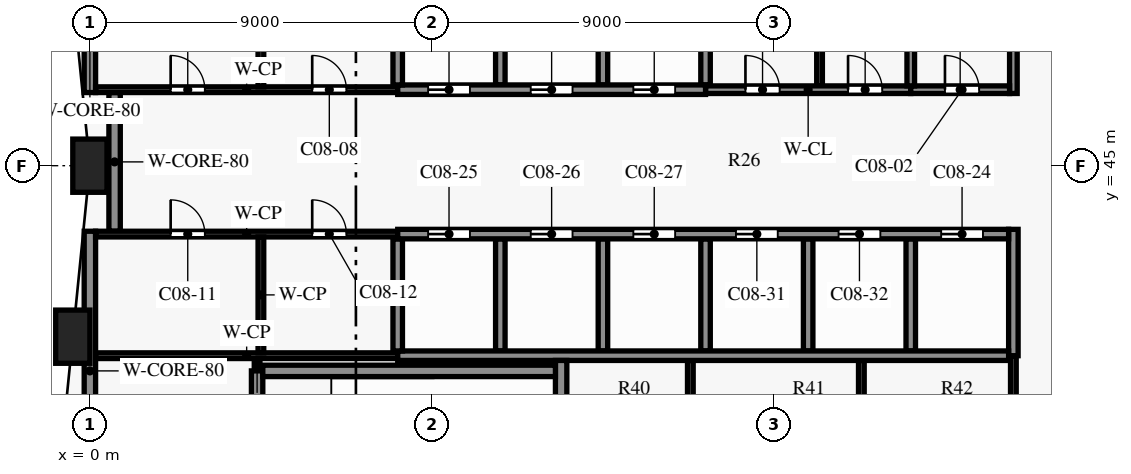
"""IFC4 building model, lengths in metres.
Left out: names, types, materials, properties, quantities, classifications, styles, units other than length and angle.
Written with IfcOpenShell. Run it as: python <this file> out.ifc"""

import sys

from ifc_helpers import new_model, si_unit, direction, frame, frame_2d, origin, origin_2d, place, context, subcontext, project, spatial, rectangle, extrude, element, fill, save


model = new_model("IFC4")
c1 = context("Model", 3, precision=1e-05, world=origin(), true_north=direction((0.0, 1.0)))
c2 = subcontext(c1, "Body", "Model", "MODEL_VIEW")
j1 = project(units=[si_unit("LENGTHUNIT", "METRE"), si_unit("PLANEANGLEUNIT", "RADIAN")], contexts=[c1])
p1 = place(None, origin())
s1 = spatial("IfcSite", under=j1, at=p1, CompositionType="ELEMENT")
p2 = place(p1, origin())
s2 = spatial("IfcBuilding", under=s1, at=p2, CompositionType="ELEMENT")
p3 = place(p2, frame((0.0, 0.0, 37.5)))
s3 = spatial("IfcBuildingStorey", under=s2, at=p3, CompositionType="ELEMENT", Elevation=37.5)
for number, where, z_axis, x_axis in (
    (1, (0.0, 45.0, 0.0), (0.0, 0.0, 1.0), (0.0, -1.0, 0.0)),
    (2, (-0.45, 40.5, 0.0), (0.0, 0.0, 1.0), (-0.1, -0.995, 0.0)),
):
    element("IfcColumn", number, at=place(p3, frame(where, z_axis=z_axis, x_axis=x_axis)), inside=s3, PredefinedType="COLUMN", context=c2, shape_type="SweptSolid", body=[
        extrude(rectangle(XDim=0.9, YDim=1.4, at=origin_2d()), origin(), (0.0, 0.0, 1.0), 3.6),
    ])
p4 = place(p3, frame((4.55, 39.6, 0.0), z_axis=(0.0, 0.0, 1.0), x_axis=(1.0, 0.0, 0.0)))
e3 = element("IfcWall", 3, at=p4, inside=s3, PredefinedType="SHEAR", context=c2, shape_type="SweptSolid", body=[
    extrude(rectangle(XDim=7.7, YDim=0.3, at=frame_2d((3.85, 0.0))), origin(), (0.0, 0.0, 1.0), 3.3),
])
p5 = place(p3, frame((0.15, 40.0, 0.0), z_axis=(0.0, 0.0, 1.0), x_axis=(1.0, 0.0, 0.0)))
e4 = element("IfcWall", 4, at=p5, inside=s3, PredefinedType="PARTITIONING", context=c2, shape_type="SweptSolid", body=[
    extrude(rectangle(XDim=7.95, YDim=0.15, at=frame_2d((3.975, 0.0))), origin(), (0.0, 0.0, 1.0), 3.3),
])
p6 = place(p3, frame((8.1, 40.0, 0.0), z_axis=(0.0, 0.0, 1.0), x_axis=(1.0, 0.0, 0.0)))
e5 = element("IfcWall", 5, at=p6, inside=s3, PredefinedType="SHEAR", context=c2, shape_type="SweptSolid", body=[
    extrude(rectangle(XDim=16.075, YDim=0.25, at=frame_2d((8.038, 0.0))), origin(), (0.0, 0.0, 1.0), 3.3),
])
p7 = place(p3, frame((0.15, 43.2, 0.0), z_axis=(0.0, 0.0, 1.0), x_axis=(1.0, 0.0, 0.0)))
e6 = element("IfcWall", 6, at=p7, inside=s3, PredefinedType="PARTITIONING", context=c2, shape_type="SweptSolid", body=[
    extrude(rectangle(XDim=7.95, YDim=0.15, at=frame_2d((3.975, 0.0))), origin(), (0.0, 0.0, 1.0), 3.3),
])
p8 = place(p7, frame((1.975, 0.0, 0.0)))
e7 = element("IfcOpeningElement", 7, at=p8, cuts=e6, PredefinedType="OPENING", context=c2, shape_type="SweptSolid", body=[
    extrude(rectangle(XDim=0.9, YDim=2.1, at=frame_2d((0.45, 1.05))), frame((0.0, 0.085, 0.0), z_axis=(0.0, -1.0, 0.0), x_axis=(1.0, 0.0, 0.0)), (0.0, 0.0, 1.0), 0.17),
])
p9 = place(p7, frame((5.7, 0.0, 0.0)))
e8 = element("IfcOpeningElement", 8, at=p9, cuts=e6, PredefinedType="OPENING", context=c2, shape_type="SweptSolid", body=[
    extrude(rectangle(XDim=0.9, YDim=2.1, at=frame_2d((0.45, 1.05))), frame((0.0, 0.085, 0.0), z_axis=(0.0, -1.0, 0.0), x_axis=(1.0, 0.0, 0.0)), (0.0, 0.0, 1.0), 0.17),
])
p10 = place(p3, frame((8.1, 43.2, 0.0), z_axis=(0.0, 0.0, 1.0), x_axis=(1.0, 0.0, 0.0)))
e9 = element("IfcWall", 9, at=p10, inside=s3, PredefinedType="SHEAR", context=c2, shape_type="SweptSolid", body=[
    extrude(rectangle(XDim=16.075, YDim=0.25, at=frame_2d((8.038, 0.0))), origin(), (0.0, 0.0, 1.0), 3.3),
])
p11 = place(p10, frame((14.3, 0.0, 0.0)))
e10 = element("IfcOpeningElement", 10, at=p11, cuts=e9, PredefinedType="OPENING", context=c2, shape_type="SweptSolid", body=[
    extrude(rectangle(XDim=1.1, YDim=2.1, at=frame_2d((0.55, 1.05))), frame((0.0, 0.135, 0.0), z_axis=(0.0, -1.0, 0.0), x_axis=(1.0, 0.0, 0.0)), (0.0, 0.0, 1.0), 0.27),
])
p12 = place(p10, frame((0.8, 0.0, 0.0)))
e11 = element("IfcOpeningElement", 11, at=p12, cuts=e9, PredefinedType="OPENING", context=c2, shape_type="SweptSolid", body=[
    extrude(rectangle(XDim=1.1, YDim=2.1, at=frame_2d((0.55, 1.05))), frame((0.0, 0.135, 0.0), z_axis=(0.0, -1.0, 0.0), x_axis=(1.0, 0.0, 0.0)), (0.0, 0.0, 1.0), 0.27),
])
p13 = place(p10, frame((3.5, 0.0, 0.0)))
e12 = element("IfcOpeningElement", 12, at=p13, cuts=e9, PredefinedType="OPENING", context=c2, shape_type="SweptSolid", body=[
    extrude(rectangle(XDim=1.1, YDim=2.1, at=frame_2d((0.55, 1.05))), frame((0.0, 0.135, 0.0), z_axis=(0.0, -1.0, 0.0), x_axis=(1.0, 0.0, 0.0)), (0.0, 0.0, 1.0), 0.27),
])
p14 = place(p10, frame((6.2, 0.0, 0.0)))
e13 = element("IfcOpeningElement", 13, at=p14, cuts=e9, PredefinedType="OPENING", context=c2, shape_type="SweptSolid", body=[
    extrude(rectangle(XDim=1.1, YDim=2.1, at=frame_2d((0.55, 1.05))), frame((0.0, 0.135, 0.0), z_axis=(0.0, -1.0, 0.0), x_axis=(1.0, 0.0, 0.0)), (0.0, 0.0, 1.0), 0.27),
])
p15 = place(p10, frame((8.9, 0.0, 0.0)))
e14 = element("IfcOpeningElement", 14, at=p15, cuts=e9, PredefinedType="OPENING", context=c2, shape_type="SweptSolid", body=[
    extrude(rectangle(XDim=1.1, YDim=2.1, at=frame_2d((0.55, 1.05))), frame((0.0, 0.135, 0.0), z_axis=(0.0, -1.0, 0.0), x_axis=(1.0, 0.0, 0.0)), (0.0, 0.0, 1.0), 0.27),
])
p16 = place(p10, frame((11.6, 0.0, 0.0)))
e15 = element("IfcOpeningElement", 15, at=p16, cuts=e9, PredefinedType="OPENING", context=c2, shape_type="SweptSolid", body=[
    extrude(rectangle(XDim=1.1, YDim=2.1, at=frame_2d((0.55, 1.05))), frame((0.0, 0.135, 0.0), z_axis=(0.0, -1.0, 0.0), x_axis=(1.0, 0.0, 0.0)), (0.0, 0.0, 1.0), 0.27),
])
p17 = place(p3, frame((16.2, 47.0, 0.0), z_axis=(0.0, 0.0, 1.0), x_axis=(1.0, 0.0, 0.0)))
e16 = element("IfcWall", 16, at=p17, inside=s3, PredefinedType="PARTITIONING", context=c2, shape_type="SweptSolid", body=[
    extrude(rectangle(XDim=5.4, YDim=0.2, at=frame_2d((2.7, 0.0))), origin(), (0.0, 0.0, 1.0), 3.3),
])
p18 = place(p17, frame((1.05, 0.0, 0.0)))
e17 = element("IfcOpeningElement", 17, at=p18, cuts=e16, PredefinedType="OPENING", context=c2, shape_type="SweptSolid", body=[
    extrude(rectangle(XDim=0.9, YDim=2.1, at=frame_2d((0.45, 1.05))), frame((0.0, 0.11, 0.0), z_axis=(0.0, -1.0, 0.0), x_axis=(1.0, 0.0, 0.0)), (0.0, 0.0, 1.0), 0.22),
])
p19 = place(p17, frame((3.75, 0.0, 0.0)))
e18 = element("IfcOpeningElement", 18, at=p19, cuts=e16, PredefinedType="OPENING", context=c2, shape_type="SweptSolid", body=[
    extrude(rectangle(XDim=0.9, YDim=2.1, at=frame_2d((0.45, 1.05))), frame((0.0, 0.11, 0.0), z_axis=(0.0, -1.0, 0.0), x_axis=(1.0, 0.0, 0.0)), (0.0, 0.0, 1.0), 0.22),
])
p20 = place(p3, frame((0.15, 47.0, 0.0), z_axis=(0.0, 0.0, 1.0), x_axis=(1.0, 0.0, 0.0)))
e19 = element("IfcWall", 19, at=p20, inside=s3, PredefinedType="PARTITIONING", context=c2, shape_type="SweptSolid", body=[
    extrude(rectangle(XDim=7.95, YDim=0.15, at=frame_2d((3.975, 0.0))), origin(), (0.0, 0.0, 1.0), 3.3),
])
p21 = place(p20, frame((1.975, 0.0, 0.0)))
e20 = element("IfcOpeningElement", 20, at=p21, cuts=e19, PredefinedType="OPENING", context=c2, shape_type="SweptSolid", body=[
    extrude(rectangle(XDim=0.9, YDim=2.1, at=frame_2d((0.45, 1.05))), frame((0.0, 0.085, 0.0), z_axis=(0.0, -1.0, 0.0), x_axis=(1.0, 0.0, 0.0)), (0.0, 0.0, 1.0), 0.17),
])
p22 = place(p20, frame((5.7, 0.0, 0.0)))
e21 = element("IfcOpeningElement", 21, at=p22, cuts=e19, PredefinedType="OPENING", context=c2, shape_type="SweptSolid", body=[
    extrude(rectangle(XDim=0.9, YDim=2.1, at=frame_2d((0.45, 1.05))), frame((0.0, 0.085, 0.0), z_axis=(0.0, -1.0, 0.0), x_axis=(1.0, 0.0, 0.0)), (0.0, 0.0, 1.0), 0.17),
])
p23 = place(p3, frame((21.6, 47.0, 0.0), z_axis=(0.0, 0.0, 1.0), x_axis=(1.0, 0.0, 0.0)))
e22 = element("IfcWall", 22, at=p23, inside=s3, PredefinedType="PARTITIONING", context=c2, shape_type="SweptSolid", body=[
    extrude(rectangle(XDim=2.6, YDim=0.2, at=frame_2d((1.3, 0.0))), origin(), (0.0, 0.0, 1.0), 3.3),
])
p24 = place(p23, frame((0.9, 0.0, 0.0)))
e23 = element("IfcOpeningElement", 23, at=p24, cuts=e22, PredefinedType="OPENING", context=c2, shape_type="SweptSolid", body=[
    extrude(rectangle(XDim=0.9, YDim=2.1, at=frame_2d((0.45, 1.05))), frame((0.0, 0.11, 0.0), z_axis=(0.0, -1.0, 0.0), x_axis=(1.0, 0.0, 0.0)), (0.0, 0.0, 1.0), 0.22),
])
p25 = place(p3, frame((8.1, 47.0, 0.0), z_axis=(0.0, 0.0, 1.0), x_axis=(1.0, 0.0, 0.0)))
e24 = element("IfcWall", 24, at=p25, inside=s3, PredefinedType="SHEAR", context=c2, shape_type="SweptSolid", body=[
    extrude(rectangle(XDim=8.1, YDim=0.25, at=frame_2d((4.05, 0.0))), origin(), (0.0, 0.0, 1.0), 3.3),
])
p26 = place(p25, frame((0.8, 0.0, 0.0)))
e25 = element("IfcOpeningElement", 25, at=p26, cuts=e24, PredefinedType="OPENING", context=c2, shape_type="SweptSolid", body=[
    extrude(rectangle(XDim=1.1, YDim=2.1, at=frame_2d((0.55, 1.05))), frame((0.0, 0.135, 0.0), z_axis=(0.0, -1.0, 0.0), x_axis=(1.0, 0.0, 0.0)), (0.0, 0.0, 1.0), 0.27),
])
p27 = place(p25, frame((3.5, 0.0, 0.0)))
e26 = element("IfcOpeningElement", 26, at=p27, cuts=e24, PredefinedType="OPENING", context=c2, shape_type="SweptSolid", body=[
    extrude(rectangle(XDim=1.1, YDim=2.1, at=frame_2d((0.55, 1.05))), frame((0.0, 0.135, 0.0), z_axis=(0.0, -1.0, 0.0), x_axis=(1.0, 0.0, 0.0)), (0.0, 0.0, 1.0), 0.27),
])
p28 = place(p25, frame((6.2, 0.0, 0.0)))
e27 = element("IfcOpeningElement", 27, at=p28, cuts=e24, PredefinedType="OPENING", context=c2, shape_type="SweptSolid", body=[
    extrude(rectangle(XDim=1.1, YDim=2.1, at=frame_2d((0.55, 1.05))), frame((0.0, 0.135, 0.0), z_axis=(0.0, -1.0, 0.0), x_axis=(1.0, 0.0, 0.0)), (0.0, 0.0, 1.0), 0.27),
])
p29 = place(p3, frame((0.0, 35.925, 0.0), z_axis=(0.0, 0.0, 1.0), x_axis=(0.0, 1.0, 0.0)))
e28 = element("IfcWall", 28, at=p29, inside=s3, PredefinedType="SHEAR", context=c2, shape_type="SweptSolid", body=[
    extrude(rectangle(XDim=7.35, YDim=0.3, at=frame_2d((3.675, 0.0))), origin(), (0.0, 0.0, 1.0), 3.3),
])
p30 = place(p3, frame((0.0, 46.925, 0.0), z_axis=(0.0, 0.0, 1.0), x_axis=(0.0, 1.0, 0.0)))
e29 = element("IfcWall", 29, at=p30, inside=s3, PredefinedType="SHEAR", context=c2, shape_type="SweptSolid", body=[
    extrude(rectangle(XDim=3.425, YDim=0.3, at=frame_2d((1.712, 0.0))), origin(), (0.0, 0.0, 1.0), 3.3),
])
p31 = place(p3, frame((0.65, 43.275, 0.0), z_axis=(0.0, 0.0, 1.0), x_axis=(0.0, 1.0, 0.0)))
e30 = element("IfcWall", 30, at=p31, inside=s3, PredefinedType="SHEAR", context=c2, shape_type="SweptSolid", body=[
    extrude(rectangle(XDim=3.65, YDim=0.3, at=frame_2d((1.825, 0.0))), origin(), (0.0, 0.0, 1.0), 3.3),
])
p32 = place(p3, frame((4.4, 39.6, 0.0), z_axis=(0.0, 0.0, 1.0), x_axis=(0.0, 1.0, 0.0)))
e31 = element("IfcWall", 31, at=p32, inside=s3, PredefinedType="PARTITIONING", context=c2, shape_type="SweptSolid", body=[
    extrude(rectangle(XDim=0.325, YDim=0.15, at=frame_2d((0.163, 0.0))), origin(), (0.0, 0.0, 1.0), 3.3),
])
p33 = place(p3, frame((4.4, 36.15, 0.0), z_axis=(0.0, 0.0, 1.0), x_axis=(0.0, 1.0, 0.0)))
e32 = element("IfcWall", 32, at=p33, inside=s3, PredefinedType="SHEAR", context=c2, shape_type="SweptSolid", body=[
    extrude(rectangle(XDim=3.45, YDim=0.3, at=frame_2d((1.725, 0.0))), origin(), (0.0, 0.0, 1.0), 3.3),
])
for number, where, z_axis, x_axis in (
    (33, (4.5, 40.075, 0.0), (0.0, 0.0, 1.0), (0.0, 1.0, 0.0)),
    (34, (4.5, 47.075, 0.0), (0.0, 0.0, 1.0), (0.0, 1.0, 0.0)),
):
    element("IfcWall", number, at=place(p3, frame(where, z_axis=z_axis, x_axis=x_axis)), inside=s3, PredefinedType="PARTITIONING", context=c2, shape_type="SweptSolid", body=[
        extrude(rectangle(XDim=3.05, YDim=0.15, at=frame_2d((1.525, 0.0))), origin(), (0.0, 0.0, 1.0), 3.3),
    ])
for number, where, z_axis, x_axis in (
    (35, (8.1, 40.125, 0.0), (0.0, 0.0, 1.0), (0.0, 1.0, 0.0)),
    (36, (8.1, 47.125, 0.0), (0.0, 0.0, 1.0), (0.0, 1.0, 0.0)),
    (37, (10.8, 40.125, 0.0), (0.0, 0.0, 1.0), (0.0, 1.0, 0.0)),
    (38, (10.8, 47.125, 0.0), (0.0, 0.0, 1.0), (0.0, 1.0, 0.0)),
):
    element("IfcWall", number, at=place(p3, frame(where, z_axis=z_axis, x_axis=x_axis)), inside=s3, PredefinedType="SHEAR", context=c2, shape_type="SweptSolid", body=[
        extrude(rectangle(XDim=2.95, YDim=0.25, at=frame_2d((1.475, 0.0))), origin(), (0.0, 0.0, 1.0), 3.3),
    ])
p34 = place(p3, frame((12.4, 36.15, 0.0), z_axis=(0.0, 0.0, 1.0), x_axis=(0.0, 1.0, 0.0)))
e39 = element("IfcWall", 39, at=p34, inside=s3, PredefinedType="SHEAR", context=c2, shape_type="SweptSolid", body=[
    extrude(rectangle(XDim=3.725, YDim=0.3, at=frame_2d((1.863, 0.0))), origin(), (0.0, 0.0, 1.0), 3.3),
])
for number, where, z_axis, x_axis in (
    (40, (13.5, 40.125, 0.0), (0.0, 0.0, 1.0), (0.0, 1.0, 0.0)),
    (41, (13.5, 47.125, 0.0), (0.0, 0.0, 1.0), (0.0, 1.0, 0.0)),
):
    element("IfcWall", number, at=place(p3, frame(where, z_axis=z_axis, x_axis=x_axis)), inside=s3, PredefinedType="SHEAR", context=c2, shape_type="SweptSolid", body=[
        extrude(rectangle(XDim=2.95, YDim=0.25, at=frame_2d((1.475, 0.0))), origin(), (0.0, 0.0, 1.0), 3.3),
    ])
p35 = place(p3, frame((15.8, 36.075, 0.0), z_axis=(0.0, 0.0, 1.0), x_axis=(0.0, 1.0, 0.0)))
e42 = element("IfcWall", 42, at=p35, inside=s3, PredefinedType="PARTITIONING", context=c2, shape_type="SweptSolid", body=[
    extrude(rectangle(XDim=3.8, YDim=0.15, at=frame_2d((1.9, 0.0))), origin(), (0.0, 0.0, 1.0), 3.3),
])
p36 = place(p3, frame((16.2, 40.125, 0.0), z_axis=(0.0, 0.0, 1.0), x_axis=(0.0, 1.0, 0.0)))
e43 = element("IfcWall", 43, at=p36, inside=s3, PredefinedType="SHEAR", context=c2, shape_type="SweptSolid", body=[
    extrude(rectangle(XDim=2.95, YDim=0.25, at=frame_2d((1.475, 0.0))), origin(), (0.0, 0.0, 1.0), 3.3),
])
p37 = place(p3, frame((16.2, 47.125, 0.0), z_axis=(0.0, 0.0, 1.0), x_axis=(0.0, 1.0, 0.0)))
e44 = element("IfcWall", 44, at=p37, inside=s3, PredefinedType="SHEAR", context=c2, shape_type="SweptSolid", body=[
    extrude(rectangle(XDim=3.075, YDim=0.25, at=frame_2d((1.538, 0.0))), origin(), (0.0, 0.0, 1.0), 3.3),
])
p38 = place(p3, frame((18.9, 40.125, 0.0), z_axis=(0.0, 0.0, 1.0), x_axis=(0.0, 1.0, 0.0)))
e45 = element("IfcWall", 45, at=p38, inside=s3, PredefinedType="SHEAR", context=c2, shape_type="SweptSolid", body=[
    extrude(rectangle(XDim=2.95, YDim=0.25, at=frame_2d((1.475, 0.0))), origin(), (0.0, 0.0, 1.0), 3.3),
])
p39 = place(p3, frame((19.2, 47.1, 0.0), z_axis=(0.0, 0.0, 1.0), x_axis=(0.0, 1.0, 0.0)))
e46 = element("IfcWall", 46, at=p39, inside=s3, PredefinedType="PARTITIONING", context=c2, shape_type="SweptSolid", body=[
    extrude(rectangle(XDim=4.625, YDim=0.15, at=frame_2d((2.312, 0.0))), origin(), (0.0, 0.0, 1.0), 3.3),
])
p40 = place(p3, frame((20.3, 36.075, 0.0), z_axis=(0.0, 0.0, 1.0), x_axis=(0.0, 1.0, 0.0)))
e47 = element("IfcWall", 47, at=p40, inside=s3, PredefinedType="PARTITIONING", context=c2, shape_type="SweptSolid", body=[
    extrude(rectangle(XDim=3.8, YDim=0.15, at=frame_2d((1.9, 0.0))), origin(), (0.0, 0.0, 1.0), 3.3),
])
p41 = place(p3, frame((21.6, 47.1, 0.0), z_axis=(0.0, 0.0, 1.0), x_axis=(0.0, 1.0, 0.0)))
e48 = element("IfcWall", 48, at=p41, inside=s3, PredefinedType="PARTITIONING", context=c2, shape_type="SweptSolid", body=[
    extrude(rectangle(XDim=4.6, YDim=0.2, at=frame_2d((2.3, 0.0))), origin(), (0.0, 0.0, 1.0), 3.3),
])
p42 = place(p3, frame((21.6, 40.125, 0.0), z_axis=(0.0, 0.0, 1.0), x_axis=(0.0, 1.0, 0.0)))
e49 = element("IfcWall", 49, at=p42, inside=s3, PredefinedType="SHEAR", context=c2, shape_type="SweptSolid", body=[
    extrude(rectangle(XDim=2.95, YDim=0.25, at=frame_2d((1.475, 0.0))), origin(), (0.0, 0.0, 1.0), 3.3),
])
p43 = place(p3, frame((24.3, 35.925, 0.0), z_axis=(0.0, 0.0, 1.0), x_axis=(0.0, 1.0, 0.0)))
e50 = element("IfcWall", 50, at=p43, inside=s3, PredefinedType="SHEAR", context=c2, shape_type="SweptSolid", body=[
    extrude(rectangle(XDim=4.075, YDim=0.15, at=frame_2d((2.038, 0.0))), origin(), (0.0, 0.0, 1.0), 3.3),
])
p44 = place(p3, frame((24.3, 46.9, 0.0), z_axis=(0.0, 0.0, 1.0), x_axis=(0.0, 1.0, 0.0)))
e51 = element("IfcWall", 51, at=p44, inside=s3, PredefinedType="SHEAR", context=c2, shape_type="SweptSolid", body=[
    extrude(rectangle(XDim=5.0, YDim=0.2, at=frame_2d((2.5, 0.0))), origin(), (0.0, 0.0, 1.0), 3.3),
])
p45 = place(p3, frame((24.3, 40.0, 0.0), z_axis=(0.0, 0.0, 1.0), x_axis=(0.0, 1.0, 0.0)))
e52 = element("IfcWall", 52, at=p45, inside=s3, PredefinedType="SHEAR", context=c2, shape_type="SweptSolid", body=[
    extrude(rectangle(XDim=3.325, YDim=0.25, at=frame_2d((1.663, 0.0))), origin(), (0.0, 0.0, 1.0), 3.3),
])
p46 = place(p24, origin())
e53 = element("IfcDoor", 53, at=p46, inside=s3, OperationType="SINGLE_SWING_LEFT", PredefinedType="DOOR", context=c2, shape_type="SweptSolid", body=[
    extrude(rectangle(XDim=0.9, YDim=2.1, at=frame_2d((0.45, 1.05))), frame((0.0, 0.025, 0.0), z_axis=(0.0, -1.0, 0.0), x_axis=(1.0, 0.0, 0.0)), (0.0, 0.0, 1.0), 0.05),
])
fill(e23, e53)
p47 = place(p21, origin())
e54 = element("IfcDoor", 54, at=p47, inside=s3, OperationType="SINGLE_SWING_RIGHT", PredefinedType="DOOR", context=c2, shape_type="SweptSolid", body=[
    extrude(rectangle(XDim=0.9, YDim=2.1, at=frame_2d((0.45, 1.05))), frame((0.0, 0.025, 0.0), z_axis=(0.0, -1.0, 0.0), x_axis=(1.0, 0.0, 0.0)), (0.0, 0.0, 1.0), 0.05),
])
fill(e20, e54)
p48 = place(p22, origin())
e55 = element("IfcDoor", 55, at=p48, inside=s3, OperationType="SINGLE_SWING_LEFT", PredefinedType="DOOR", context=c2, shape_type="SweptSolid", body=[
    extrude(rectangle(XDim=0.9, YDim=2.1, at=frame_2d((0.45, 1.05))), frame((0.0, 0.025, 0.0), z_axis=(0.0, -1.0, 0.0), x_axis=(1.0, 0.0, 0.0)), (0.0, 0.0, 1.0), 0.05),
])
fill(e21, e55)
p49 = place(p18, origin())
e56 = element("IfcDoor", 56, at=p49, inside=s3, OperationType="SINGLE_SWING_LEFT", PredefinedType="DOOR", context=c2, shape_type="SweptSolid", body=[
    extrude(rectangle(XDim=0.9, YDim=2.1, at=frame_2d((0.45, 1.05))), frame((0.0, 0.025, 0.0), z_axis=(0.0, -1.0, 0.0), x_axis=(1.0, 0.0, 0.0)), (0.0, 0.0, 1.0), 0.05),
])
fill(e17, e56)
p50 = place(p19, origin())
e57 = element("IfcDoor", 57, at=p50, inside=s3, OperationType="SINGLE_SWING_RIGHT", PredefinedType="DOOR", context=c2, shape_type="SweptSolid", body=[
    extrude(rectangle(XDim=0.9, YDim=2.1, at=frame_2d((0.45, 1.05))), frame((0.0, 0.025, 0.0), z_axis=(0.0, -1.0, 0.0), x_axis=(1.0, 0.0, 0.0)), (0.0, 0.0, 1.0), 0.05),
])
fill(e18, e57)
p51 = place(p8, origin())
e58 = element("IfcDoor", 58, at=p51, inside=s3, OperationType="SINGLE_SWING_LEFT", PredefinedType="DOOR", context=c2, shape_type="SweptSolid", body=[
    extrude(rectangle(XDim=0.9, YDim=2.1, at=frame_2d((0.45, 1.05))), frame((0.0, 0.025, 0.0), z_axis=(0.0, -1.0, 0.0), x_axis=(1.0, 0.0, 0.0)), (0.0, 0.0, 1.0), 0.05),
])
fill(e7, e58)
p52 = place(p9, origin())
e59 = element("IfcDoor", 59, at=p52, inside=s3, OperationType="SINGLE_SWING_RIGHT", PredefinedType="DOOR", context=c2, shape_type="SweptSolid", body=[
    extrude(rectangle(XDim=0.9, YDim=2.1, at=frame_2d((0.45, 1.05))), frame((0.0, 0.025, 0.0), z_axis=(0.0, -1.0, 0.0), x_axis=(1.0, 0.0, 0.0)), (0.0, 0.0, 1.0), 0.05),
])
fill(e8, e59)
p53 = place(p11, origin())
e60 = element("IfcDoor", 60, at=p53, inside=s3, OperationType="DOUBLE_DOOR_SLIDING", PredefinedType="DOOR", context=c2, shape_type="SweptSolid", body=[
    extrude(rectangle(XDim=1.1, YDim=2.1, at=frame_2d((0.55, 1.05))), frame((0.0, 0.025, 0.0), z_axis=(0.0, -1.0, 0.0), x_axis=(1.0, 0.0, 0.0)), (0.0, 0.0, 1.0), 0.05),
])
fill(e10, e60)
p54 = place(p12, origin())
e61 = element("IfcDoor", 61, at=p54, inside=s3, OperationType="DOUBLE_DOOR_SLIDING", PredefinedType="DOOR", context=c2, shape_type="SweptSolid", body=[
    extrude(rectangle(XDim=1.1, YDim=2.1, at=frame_2d((0.55, 1.05))), frame((0.0, 0.025, 0.0), z_axis=(0.0, -1.0, 0.0), x_axis=(1.0, 0.0, 0.0)), (0.0, 0.0, 1.0), 0.05),
])
fill(e11, e61)
p55 = place(p13, origin())
e62 = element("IfcDoor", 62, at=p55, inside=s3, OperationType="DOUBLE_DOOR_SLIDING", PredefinedType="DOOR", context=c2, shape_type="SweptSolid", body=[
    extrude(rectangle(XDim=1.1, YDim=2.1, at=frame_2d((0.55, 1.05))), frame((0.0, 0.025, 0.0), z_axis=(0.0, -1.0, 0.0), x_axis=(1.0, 0.0, 0.0)), (0.0, 0.0, 1.0), 0.05),
])
fill(e12, e62)
p56 = place(p14, origin())
e63 = element("IfcDoor", 63, at=p56, inside=s3, OperationType="DOUBLE_DOOR_SLIDING", PredefinedType="DOOR", context=c2, shape_type="SweptSolid", body=[
    extrude(rectangle(XDim=1.1, YDim=2.1, at=frame_2d((0.55, 1.05))), frame((0.0, 0.025, 0.0), z_axis=(0.0, -1.0, 0.0), x_axis=(1.0, 0.0, 0.0)), (0.0, 0.0, 1.0), 0.05),
])
fill(e13, e63)
p57 = place(p26, origin())
e64 = element("IfcDoor", 64, at=p57, inside=s3, OperationType="DOUBLE_DOOR_SLIDING", PredefinedType="DOOR", context=c2, shape_type="SweptSolid", body=[
    extrude(rectangle(XDim=1.1, YDim=2.1, at=frame_2d((0.55, 1.05))), frame((0.0, 0.025, 0.0), z_axis=(0.0, -1.0, 0.0), x_axis=(1.0, 0.0, 0.0)), (0.0, 0.0, 1.0), 0.05),
])
fill(e25, e64)
p58 = place(p27, origin())
e65 = element("IfcDoor", 65, at=p58, inside=s3, OperationType="DOUBLE_DOOR_SLIDING", PredefinedType="DOOR", context=c2, shape_type="SweptSolid", body=[
    extrude(rectangle(XDim=1.1, YDim=2.1, at=frame_2d((0.55, 1.05))), frame((0.0, 0.025, 0.0), z_axis=(0.0, -1.0, 0.0), x_axis=(1.0, 0.0, 0.0)), (0.0, 0.0, 1.0), 0.05),
])
fill(e26, e65)
p59 = place(p28, origin())
e66 = element("IfcDoor", 66, at=p59, inside=s3, OperationType="DOUBLE_DOOR_SLIDING", PredefinedType="DOOR", context=c2, shape_type="SweptSolid", body=[
    extrude(rectangle(XDim=1.1, YDim=2.1, at=frame_2d((0.55, 1.05))), frame((0.0, 0.025, 0.0), z_axis=(0.0, -1.0, 0.0), x_axis=(1.0, 0.0, 0.0)), (0.0, 0.0, 1.0), 0.05),
])
fill(e27, e66)
p60 = place(p15, origin())
e67 = element("IfcDoor", 67, at=p60, inside=s3, OperationType="DOUBLE_DOOR_SLIDING", PredefinedType="DOOR", context=c2, shape_type="SweptSolid", body=[
    extrude(rectangle(XDim=1.1, YDim=2.1, at=frame_2d((0.55, 1.05))), frame((0.0, 0.025, 0.0), z_axis=(0.0, -1.0, 0.0), x_axis=(1.0, 0.0, 0.0)), (0.0, 0.0, 1.0), 0.05),
])
fill(e14, e67)
p61 = place(p16, origin())
e68 = element("IfcDoor", 68, at=p61, inside=s3, OperationType="DOUBLE_DOOR_SLIDING", PredefinedType="DOOR", context=c2, shape_type="SweptSolid", body=[
    extrude(rectangle(XDim=1.1, YDim=2.1, at=frame_2d((0.55, 1.05))), frame((0.0, 0.025, 0.0), z_axis=(0.0, -1.0, 0.0), x_axis=(1.0, 0.0, 0.0)), (0.0, 0.0, 1.0), 0.05),
])
fill(e15, e68)
save(model, sys.argv[1])
